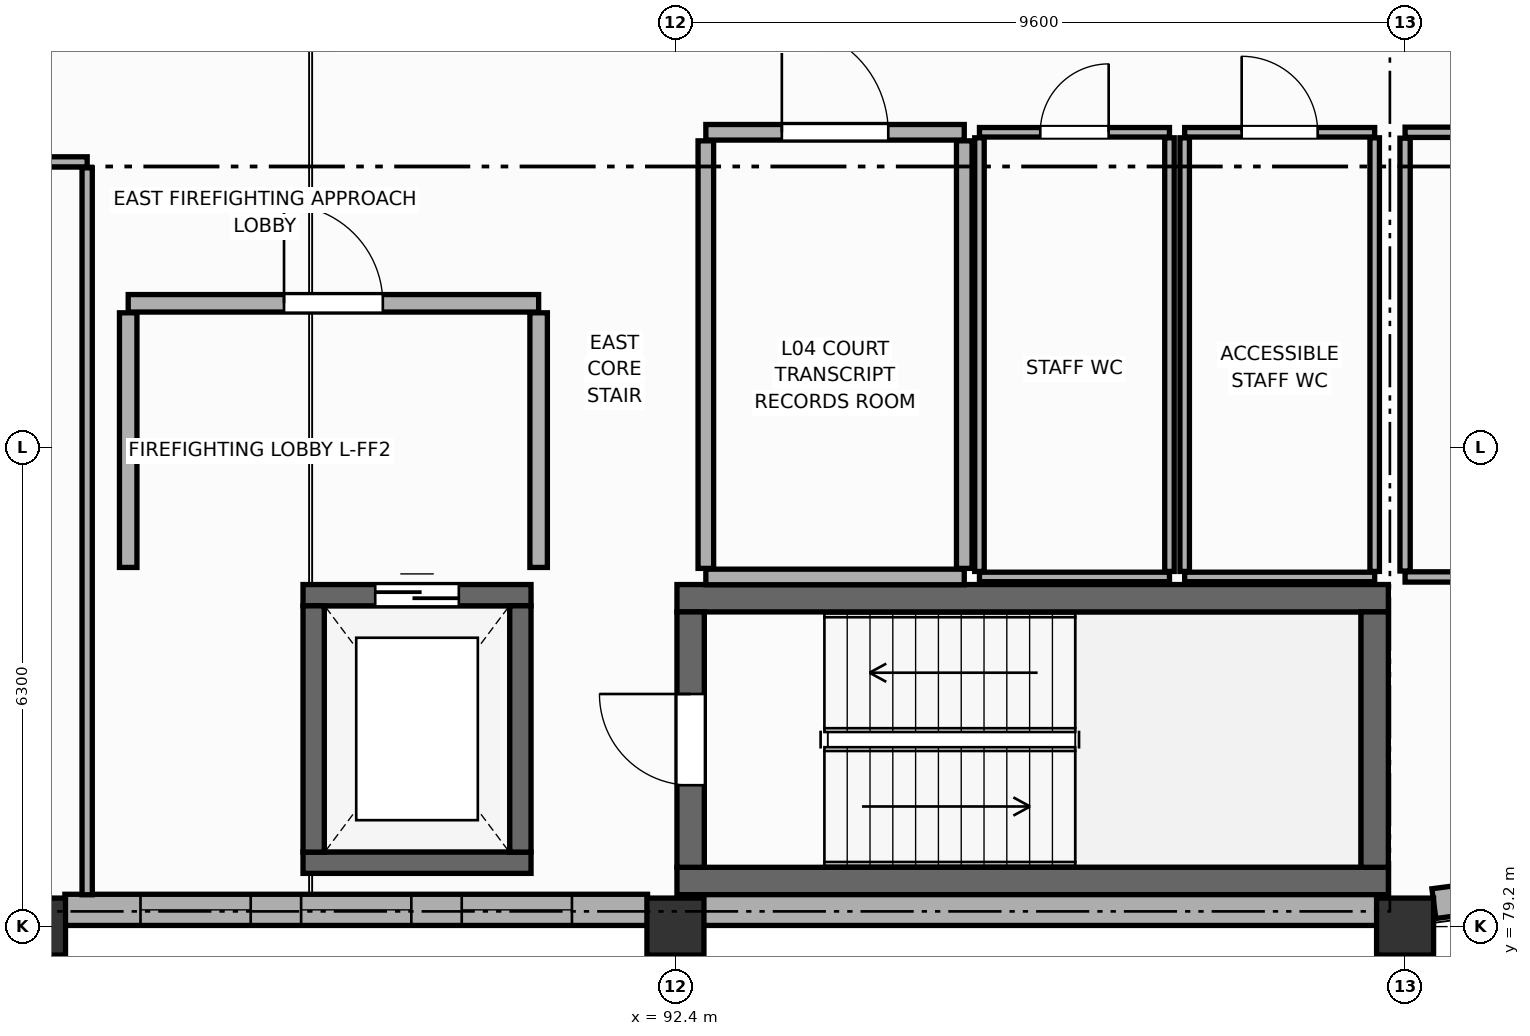
"""IFC4 building model, lengths in metres.
Left out: names, types, materials, properties, quantities, classifications, styles, units other than length and angle.
Written with IfcOpenShell. Run it as: python <this file> out.ifc"""

import sys

from ifc_helpers import new_model, si_unit, direction, frame, frame_2d, origin, origin_2d, place, context, subcontext, project, spatial, rectangle, extrude, element, fill, save


model = new_model("IFC4")
c1 = context("Model", 3, precision=1e-05, world=origin(), true_north=direction((0.0, 1.0)))
c2 = subcontext(c1, "Body", "Model", "MODEL_VIEW")
j1 = project(units=[si_unit("LENGTHUNIT", "METRE"), si_unit("PLANEANGLEUNIT", "RADIAN")], contexts=[c1])
p1 = place(None, origin())
s1 = spatial("IfcSite", under=j1, at=p1, CompositionType="ELEMENT")
p2 = place(p1, origin())
s2 = spatial("IfcBuilding", under=s1, at=p2, CompositionType="ELEMENT")
p3 = place(p2, frame((0.0, 0.0, 14.4)))
s3 = spatial("IfcBuildingStorey", under=s2, at=p3, CompositionType="ELEMENT", Elevation=14.4)
for number, where, z_axis, x_axis in (
    (1, (84.0, 79.2, 0.0), (0.0, 0.0, 1.0), (1.0, 0.0, 0.0)),
    (2, (92.4, 79.2, 0.0), (0.0, 0.0, 1.0), (1.0, 0.0, 0.0)),
    (3, (102.0, 79.2, 0.0), (0.0, 0.0, 1.0), (1.0, 0.0, 0.0)),
):
    element("IfcColumn", number, at=place(p3, frame(where, z_axis=z_axis, x_axis=x_axis)), inside=s3, PredefinedType="COLUMN", context=c2, shape_type="SweptSolid", body=[
        extrude(rectangle(XDim=0.75, YDim=0.75, at=origin_2d()), origin(), (0.0, 0.0, 1.0), 4.2),
    ])
p4 = place(p3, frame((92.033, 79.42, 0.0), z_axis=(0.0, 0.0, 1.0), x_axis=(-1.0, 0.0, 0.0)))
e4 = element("IfcWall", 4, at=p4, inside=s3, PredefinedType="STANDARD", context=c2, shape_type="SweptSolid", body=[
    extrude(rectangle(XDim=7.666, YDim=0.41, at=frame_2d((3.833, 0.0))), origin(), (0.0, 0.0, 1.0), 3.09),
])
p5 = place(p4, frame((0.995, 0.0, 0.85)))
e5 = element("IfcOpeningElement", 5, at=p5, cuts=e4, PredefinedType="OPENING", context=c2, shape_type="SweptSolid", body=[
    extrude(rectangle(XDim=1.45, YDim=2.05, at=frame_2d((0.725, 1.025))), frame((0.0, 0.215, 0.0), z_axis=(0.0, -1.0, 0.0), x_axis=(1.0, 0.0, 0.0)), (0.0, 0.0, 1.0), 0.43),
])
p6 = place(p4, frame((3.108, 0.0, 0.85)))
e6 = element("IfcOpeningElement", 6, at=p6, cuts=e4, PredefinedType="OPENING", context=c2, shape_type="SweptSolid", body=[
    extrude(rectangle(XDim=1.45, YDim=2.05, at=frame_2d((0.725, 1.025))), frame((0.0, 0.215, 0.0), z_axis=(0.0, -1.0, 0.0), x_axis=(1.0, 0.0, 0.0)), (0.0, 0.0, 1.0), 0.43),
])
p7 = place(p4, frame((5.221, 0.0, 0.85)))
e7 = element("IfcOpeningElement", 7, at=p7, cuts=e4, PredefinedType="OPENING", context=c2, shape_type="SweptSolid", body=[
    extrude(rectangle(XDim=1.45, YDim=2.05, at=frame_2d((0.725, 1.025))), frame((0.0, 0.215, 0.0), z_axis=(0.0, -1.0, 0.0), x_axis=(1.0, 0.0, 0.0)), (0.0, 0.0, 1.0), 0.43),
])
p8 = place(p3, frame((101.633, 79.42, 0.0), z_axis=(0.0, 0.0, 1.0), x_axis=(-1.0, 0.0, 0.0)))
e8 = element("IfcWall", 8, at=p8, inside=s3, PredefinedType="STANDARD", context=c2, shape_type="SweptSolid", body=[
    extrude(rectangle(XDim=8.866, YDim=0.41, at=frame_2d((4.433, 0.0))), origin(), (0.0, 0.0, 1.0), 3.09),
])
p9 = place(p3, frame((102.379, 79.502, 0.0), z_axis=(0.0, 0.0, 1.0), x_axis=(0.991440991126, 0.130555586306, 0.0)))
e9 = element("IfcWall", 9, at=p9, inside=s3, PredefinedType="ELEMENTEDWALL", context=c2, shape_type="SweptSolid", body=[
    extrude(rectangle(XDim=2.874, YDim=0.395, at=frame_2d((1.437, 0.0))), origin(), (0.0, 0.0, 1.0), 3.09),
])
p10 = place(p9, frame((1.037, 0.0, 0.85)))
e10 = element("IfcOpeningElement", 10, at=p10, cuts=e9, PredefinedType="OPENING", context=c2, shape_type="SweptSolid", body=[
    extrude(rectangle(XDim=0.8, YDim=1.7, at=frame_2d((0.4, 0.85))), frame((0.0, 0.208, 0.0), z_axis=(0.0, -1.0, 0.0), x_axis=(1.0, 0.0, 0.0)), (0.0, 0.0, 1.0), 0.415),
])
p11 = place(p3, frame((102.2, 79.0, 0.235), z_axis=(0.0, 0.0, 1.0), x_axis=(1.0, 0.0, 0.0)))
e11 = element("IfcWall", 11, at=p11, inside=s3, PredefinedType="PARAPET", context=c2, shape_type="SweptSolid", body=[
    extrude(rectangle(XDim=17.6, YDim=0.265, at=frame_2d((8.8, 0.0))), origin(), (0.0, 0.0, 1.0), 1.145),
])
for number, where, z_axis, x_axis in (
    (12, (92.42, 83.52, 0.0), (0.0, 0.0, 1.0), (1.0, 0.0, 0.0)),
    (13, (101.78, 79.8, 0.0), (0.0, 0.0, 1.0), (-1.0, 0.0, 0.0)),
):
    element("IfcWall", number, at=place(p3, frame(where, z_axis=z_axis, x_axis=x_axis)), inside=s3, PredefinedType="SHEAR", context=c2, shape_type="SweptSolid", body=[
        extrude(rectangle(XDim=9.36, YDim=0.36, at=frame_2d((4.68, 0.0))), origin(), (0.0, 0.0, 1.0), 3.96),
    ])
p12 = place(p3, frame((92.6, 79.98, 0.0), z_axis=(0.0, 0.0, 1.0), x_axis=(0.0, 1.0, 0.0)))
e14 = element("IfcWall", 14, at=p12, inside=s3, PredefinedType="SHEAR", context=c2, shape_type="SweptSolid", body=[
    extrude(rectangle(XDim=3.36, YDim=0.36, at=frame_2d((1.68, 0.0))), origin(), (0.0, 0.0, 1.0), 3.96),
])
p13 = place(p12, frame((1.08, 0.0, 0.0)))
e15 = element("IfcOpeningElement", 15, at=p13, cuts=e14, PredefinedType="OPENING", context=c2, shape_type="SweptSolid", body=[
    extrude(rectangle(XDim=1.2, YDim=2.2, at=frame_2d((0.6, 1.1))), frame((0.0, 0.19, 0.0), z_axis=(0.0, -1.0, 0.0), x_axis=(1.0, 0.0, 0.0)), (0.0, 0.0, 1.0), 0.38),
])
p14 = place(p3, frame((101.6, 83.34, 0.0), z_axis=(0.0, 0.0, 1.0), x_axis=(0.0, -1.0, 0.0)))
e16 = element("IfcWall", 16, at=p14, inside=s3, PredefinedType="SHEAR", context=c2, shape_type="SweptSolid", body=[
    extrude(rectangle(XDim=3.36, YDim=0.36, at=frame_2d((1.68, 0.0))), origin(), (0.0, 0.0, 1.0), 3.96),
])
p15 = place(p3, frame((87.5, 83.56, 0.0), z_axis=(0.0, 0.0, 1.0), x_axis=(1.0, 0.0, 0.0)))
e17 = element("IfcWall", 17, at=p15, inside=s3, PredefinedType="SHEAR", context=c2, shape_type="SweptSolid", body=[
    extrude(rectangle(XDim=3.0, YDim=0.28, at=frame_2d((1.5, 0.0))), origin(), (0.0, 0.0, 1.0), 3.96),
])
p16 = place(p15, frame((0.95, 0.0, 0.0)))
e18 = element("IfcOpeningElement", 18, at=p16, cuts=e17, PredefinedType="OPENING", context=c2, shape_type="SweptSolid", body=[
    extrude(rectangle(XDim=1.1, YDim=2.2, at=frame_2d((0.55, 1.1))), frame((0.0, 0.15, 0.0), z_axis=(0.0, -1.0, 0.0), x_axis=(1.0, 0.0, 0.0)), (0.0, 0.0, 1.0), 0.3),
])
p17 = place(p3, frame((90.5, 80.04, 0.0), z_axis=(0.0, 0.0, 1.0), x_axis=(-1.0, 0.0, 0.0)))
e19 = element("IfcWall", 19, at=p17, inside=s3, PredefinedType="SHEAR", context=c2, shape_type="SweptSolid", body=[
    extrude(rectangle(XDim=3.0, YDim=0.28, at=frame_2d((1.5, 0.0))), origin(), (0.0, 0.0, 1.0), 3.96),
])
for number, where, z_axis, x_axis in (
    (20, (87.64, 80.18, 0.0), (0.0, 0.0, 1.0), (0.0, 1.0, 0.0)),
    (21, (90.36, 83.42, 0.0), (0.0, 0.0, 1.0), (0.0, -1.0, 0.0)),
):
    element("IfcWall", number, at=place(p3, frame(where, z_axis=z_axis, x_axis=x_axis)), inside=s3, PredefinedType="SHEAR", context=c2, shape_type="SweptSolid", body=[
        extrude(rectangle(XDim=3.24, YDim=0.28, at=frame_2d((1.62, 0.0))), origin(), (0.0, 0.0, 1.0), 3.96),
    ])
p18 = place(p3, frame((85.2, 87.4, 0.0), z_axis=(0.0, 0.0, 1.0), x_axis=(1.0, 0.0, 0.0)))
e22 = element("IfcWall", 22, at=p18, inside=s3, PredefinedType="STANDARD", context=c2, shape_type="SweptSolid", body=[
    extrude(rectangle(XDim=5.4, YDim=0.23, at=frame_2d((2.7, 0.0))), origin(), (0.0, 0.0, 1.0), 3.34),
])
p19 = place(p18, frame((2.05, 0.0, 0.0)))
e23 = element("IfcOpeningElement", 23, at=p19, cuts=e22, PredefinedType="OPENING", context=c2, shape_type="SweptSolid", body=[
    extrude(rectangle(XDim=1.3, YDim=2.2, at=frame_2d((0.65, 1.1))), frame((0.0, 0.125, 0.0), z_axis=(0.0, -1.0, 0.0), x_axis=(1.0, 0.0, 0.0)), (0.0, 0.0, 1.0), 0.25),
])
for number, where, z_axis, x_axis in (
    (24, (85.2, 83.925, 0.0), (0.0, 0.0, 1.0), (0.0, 1.0, 0.0)),
    (25, (90.6, 87.275, 0.0), (0.0, 0.0, 1.0), (0.0, -1.0, 0.0)),
):
    element("IfcWall", number, at=place(p3, frame(where, z_axis=z_axis, x_axis=x_axis)), inside=s3, PredefinedType="STANDARD", context=c2, shape_type="SweptSolid", body=[
        extrude(rectangle(XDim=3.35, YDim=0.23, at=frame_2d((1.675, 0.0))), origin(), (0.0, 0.0, 1.0), 3.34),
    ])
p20 = place(p3, frame((96.4, 89.65, 0.0), z_axis=(0.0, 0.0, 1.0), x_axis=(1.0, 0.0, 0.0)))
e26 = element("IfcWall", 26, at=p20, inside=s3, PredefinedType="PARTITIONING", context=c2, shape_type="SweptSolid", body=[
    extrude(rectangle(XDim=2.5, YDim=0.125, at=frame_2d((1.25, 0.0))), origin(), (0.0, 0.0, 1.0), 3.945),
])
p21 = place(p20, frame((0.8, 0.0, 0.0)))
e27 = element("IfcOpeningElement", 27, at=p21, cuts=e26, PredefinedType="OPENING", context=c2, shape_type="SweptSolid", body=[
    extrude(rectangle(XDim=0.9, YDim=2.1, at=frame_2d((0.45, 1.05))), frame((0.0, 0.073, 0.0), z_axis=(0.0, -1.0, 0.0), x_axis=(1.0, 0.0, 0.0)), (0.0, 0.0, 1.0), 0.145),
])
p22 = place(p3, frame((98.9, 83.8, 0.0), z_axis=(0.0, 0.0, 1.0), x_axis=(-1.0, 0.0, 0.0)))
e28 = element("IfcWall", 28, at=p22, inside=s3, PredefinedType="PARTITIONING", context=c2, shape_type="SweptSolid", body=[
    extrude(rectangle(XDim=2.5, YDim=0.125, at=frame_2d((1.25, 0.0))), origin(), (0.0, 0.0, 1.0), 3.945),
])
for number, where, z_axis, x_axis in (
    (29, (96.4, 83.873, 0.0), (0.0, 0.0, 1.0), (0.0, 1.0, 0.0)),
    (30, (98.9, 89.577, 0.0), (0.0, 0.0, 1.0), (0.0, -1.0, 0.0)),
):
    element("IfcWall", number, at=place(p3, frame(where, z_axis=z_axis, x_axis=x_axis)), inside=s3, PredefinedType="PARTITIONING", context=c2, shape_type="SweptSolid", body=[
        extrude(rectangle(XDim=5.705, YDim=0.125, at=frame_2d((2.853, 0.0))), origin(), (0.0, 0.0, 1.0), 3.34),
    ])
p23 = place(p3, frame((99.1, 89.65, 0.0), z_axis=(0.0, 0.0, 1.0), x_axis=(1.0, 0.0, 0.0)))
e31 = element("IfcWall", 31, at=p23, inside=s3, PredefinedType="PARTITIONING", context=c2, shape_type="SweptSolid", body=[
    extrude(rectangle(XDim=2.5, YDim=0.125, at=frame_2d((1.25, 0.0))), origin(), (0.0, 0.0, 1.0), 3.09),
])
p24 = place(p23, frame((0.75, 0.0, 0.0)))
e32 = element("IfcOpeningElement", 32, at=p24, cuts=e31, PredefinedType="OPENING", context=c2, shape_type="SweptSolid", body=[
    extrude(rectangle(XDim=1.0, YDim=2.1, at=frame_2d((0.5, 1.05))), frame((0.0, 0.073, 0.0), z_axis=(0.0, -1.0, 0.0), x_axis=(1.0, 0.0, 0.0)), (0.0, 0.0, 1.0), 0.145),
])
p25 = place(p3, frame((101.6, 83.8, 0.0), z_axis=(0.0, 0.0, 1.0), x_axis=(-1.0, 0.0, 0.0)))
e33 = element("IfcWall", 33, at=p25, inside=s3, PredefinedType="PARTITIONING", context=c2, shape_type="SweptSolid", body=[
    extrude(rectangle(XDim=2.5, YDim=0.125, at=frame_2d((1.25, 0.0))), origin(), (0.0, 0.0, 1.0), 3.09),
])
p26 = place(p3, frame((99.1, 83.873, 0.0), z_axis=(0.0, 0.0, 1.0), x_axis=(0.0, 1.0, 0.0)))
e34 = element("IfcWall", 34, at=p26, inside=s3, PredefinedType="PARTITIONING", context=c2, shape_type="SweptSolid", body=[
    extrude(rectangle(XDim=5.705, YDim=0.125, at=frame_2d((2.853, 0.0))), origin(), (0.0, 0.0, 1.0), 3.34),
])
p27 = place(p3, frame((101.6, 89.577, 0.0), z_axis=(0.0, 0.0, 1.0), x_axis=(0.0, -1.0, 0.0)))
e35 = element("IfcWall", 35, at=p27, inside=s3, PredefinedType="PARTITIONING", context=c2, shape_type="SweptSolid", body=[
    extrude(rectangle(XDim=5.705, YDim=0.125, at=frame_2d((2.853, 0.0))), origin(), (0.0, 0.0, 1.0), 3.09),
])
p28 = place(p3, frame((92.8, 89.65, 0.0), z_axis=(0.0, 0.0, 1.0), x_axis=(1.0, 0.0, 0.0)))
e36 = element("IfcWall", 36, at=p28, inside=s3, PredefinedType="STANDARD", context=c2, shape_type="SweptSolid", body=[
    extrude(rectangle(XDim=3.4, YDim=0.205, at=frame_2d((1.7, 0.0))), origin(), (0.0, 0.0, 1.0), 3.09),
])
p29 = place(p28, frame((1.0, 0.0, 0.0)))
e37 = element("IfcOpeningElement", 37, at=p29, cuts=e36, PredefinedType="OPENING", context=c2, shape_type="SweptSolid", body=[
    extrude(rectangle(XDim=1.4, YDim=2.25, at=frame_2d((0.7, 1.125))), frame((0.0, 0.113, 0.0), z_axis=(0.0, -1.0, 0.0), x_axis=(1.0, 0.0, 0.0)), (0.0, 0.0, 1.0), 0.225),
])
p30 = place(p3, frame((96.2, 83.8, 0.0), z_axis=(0.0, 0.0, 1.0), x_axis=(-1.0, 0.0, 0.0)))
e38 = element("IfcWall", 38, at=p30, inside=s3, PredefinedType="STANDARD", context=c2, shape_type="SweptSolid", body=[
    extrude(rectangle(XDim=3.4, YDim=0.205, at=frame_2d((1.7, 0.0))), origin(), (0.0, 0.0, 1.0), 3.09),
])
p31 = place(p3, frame((92.8, 83.913, 0.0), z_axis=(0.0, 0.0, 1.0), x_axis=(0.0, 1.0, 0.0)))
e39 = element("IfcWall", 39, at=p31, inside=s3, PredefinedType="STANDARD", context=c2, shape_type="SweptSolid", body=[
    extrude(rectangle(XDim=5.625, YDim=0.205, at=frame_2d((2.812, 0.0))), origin(), (0.0, 0.0, 1.0), 3.09),
])
p32 = place(p3, frame((96.2, 89.538, 0.0), z_axis=(0.0, 0.0, 1.0), x_axis=(0.0, -1.0, 0.0)))
e40 = element("IfcWall", 40, at=p32, inside=s3, PredefinedType="STANDARD", context=c2, shape_type="SweptSolid", body=[
    extrude(rectangle(XDim=5.625, YDim=0.205, at=frame_2d((2.812, 0.0))), origin(), (0.0, 0.0, 1.0), 3.34),
])
p33 = place(p3, frame((79.94, 89.26, 0.0), z_axis=(0.0, 0.0, 1.0), x_axis=(1.0, 0.0, 0.0)))
e41 = element("IfcWall", 41, at=p33, inside=s3, PredefinedType="PARTITIONING", context=c2, shape_type="SweptSolid", body=[
    extrude(rectangle(XDim=4.72, YDim=0.135, at=frame_2d((2.36, 0.0))), origin(), (0.0, 0.0, 1.0), 3.09),
])
p34 = place(p33, frame((1.55, 0.0, 0.0)))
e42 = element("IfcOpeningElement", 42, at=p34, cuts=e41, PredefinedType="OPENING", context=c2, shape_type="SweptSolid", body=[
    extrude(rectangle(XDim=1.02, YDim=2.15, at=frame_2d((0.51, 1.075))), frame((0.0, 0.077, 0.0), z_axis=(0.0, -1.0, 0.0), x_axis=(1.0, 0.0, 0.0)), (0.0, 0.0, 1.0), 0.155),
])
p35 = place(p3, frame((84.66, 89.183, 0.0), z_axis=(0.0, 0.0, 1.0), x_axis=(0.0, -1.0, 0.0)))
e43 = element("IfcWall", 43, at=p35, inside=s3, PredefinedType="PARTITIONING", context=c2, shape_type="SweptSolid", body=[
    extrude(rectangle(XDim=9.564, YDim=0.135, at=frame_2d((4.782, 0.0))), origin(), (0.0, 0.0, 1.0), 3.34),
])
p36 = place(p3, frame((102.0, 89.65, 0.0), z_axis=(0.0, 0.0, 1.0), x_axis=(1.0, 0.0, 0.0)))
e44 = element("IfcWall", 44, at=p36, inside=s3, PredefinedType="PARTITIONING", context=c2, shape_type="SweptSolid", body=[
    extrude(rectangle(XDim=9.5, YDim=0.135, at=frame_2d((4.75, 0.0))), origin(), (0.0, 0.0, 1.0), 2.99),
])
p37 = place(p36, frame((1.92, 0.0, 0.0)))
e45 = element("IfcOpeningElement", 45, at=p37, cuts=e44, PredefinedType="OPENING", context=c2, shape_type="SweptSolid", body=[
    extrude(rectangle(XDim=0.95, YDim=2.15, at=frame_2d((0.475, 1.075))), frame((0.0, 0.077, 0.0), z_axis=(0.0, -1.0, 0.0), x_axis=(1.0, 0.0, 0.0)), (0.0, 0.0, 1.0), 0.155),
])
p38 = place(p3, frame((111.5, 83.8, 0.0), z_axis=(0.0, 0.0, 1.0), x_axis=(-1.0, 0.0, 0.0)))
e46 = element("IfcWall", 46, at=p38, inside=s3, PredefinedType="PARTITIONING", context=c2, shape_type="SweptSolid", body=[
    extrude(rectangle(XDim=9.5, YDim=0.135, at=frame_2d((4.75, 0.0))), origin(), (0.0, 0.0, 1.0), 2.99),
])
p39 = place(p3, frame((102.0, 83.877, 0.0), z_axis=(0.0, 0.0, 1.0), x_axis=(0.0, 1.0, 0.0)))
e47 = element("IfcWall", 47, at=p39, inside=s3, PredefinedType="PARTITIONING", context=c2, shape_type="SweptSolid", body=[
    extrude(rectangle(XDim=5.695, YDim=0.135, at=frame_2d((2.848, 0.0))), origin(), (0.0, 0.0, 1.0), 3.09),
])
p40 = place(p5, origin())
e48 = element("IfcWindow", 48, at=p40, inside=s3, PartitioningType="SINGLE_PANEL", PredefinedType="WINDOW", context=c2, shape_type="SweptSolid", body=[
    extrude(rectangle(XDim=1.45, YDim=2.05, at=frame_2d((0.725, 1.025))), frame((0.0, 0.03, 0.0), z_axis=(0.0, -1.0, 0.0), x_axis=(1.0, 0.0, 0.0)), (0.0, 0.0, 1.0), 0.06),
])
fill(e5, e48)
p41 = place(p6, origin())
e49 = element("IfcWindow", 49, at=p41, inside=s3, PartitioningType="SINGLE_PANEL", PredefinedType="WINDOW", context=c2, shape_type="SweptSolid", body=[
    extrude(rectangle(XDim=1.45, YDim=2.05, at=frame_2d((0.725, 1.025))), frame((0.0, 0.03, 0.0), z_axis=(0.0, -1.0, 0.0), x_axis=(1.0, 0.0, 0.0)), (0.0, 0.0, 1.0), 0.06),
])
fill(e6, e49)
p42 = place(p7, origin())
e50 = element("IfcWindow", 50, at=p42, inside=s3, PartitioningType="SINGLE_PANEL", PredefinedType="WINDOW", context=c2, shape_type="SweptSolid", body=[
    extrude(rectangle(XDim=1.45, YDim=2.05, at=frame_2d((0.725, 1.025))), frame((0.0, 0.03, 0.0), z_axis=(0.0, -1.0, 0.0), x_axis=(1.0, 0.0, 0.0)), (0.0, 0.0, 1.0), 0.06),
])
fill(e7, e50)
p43 = place(p13, origin())
e51 = element("IfcDoor", 51, at=p43, inside=s3, OperationType="SINGLE_SWING_RIGHT", PredefinedType="DOOR", context=c2, shape_type="SweptSolid", body=[
    extrude(rectangle(XDim=1.2, YDim=2.2, at=frame_2d((0.6, 1.1))), frame((0.0, 0.025, 0.0), z_axis=(0.0, -1.0, 0.0), x_axis=(1.0, 0.0, 0.0)), (0.0, 0.0, 1.0), 0.05),
])
fill(e15, e51)
p44 = place(p16, origin())
e52 = element("IfcDoor", 52, at=p44, inside=s3, OperationType="DOUBLE_DOOR_SLIDING", PredefinedType="DOOR", context=c2, shape_type="SweptSolid", body=[
    extrude(rectangle(XDim=1.1, YDim=2.2, at=frame_2d((0.55, 1.1))), frame((0.0, 0.025, 0.0), z_axis=(0.0, -1.0, 0.0), x_axis=(1.0, 0.0, 0.0)), (0.0, 0.0, 1.0), 0.05),
])
fill(e18, e52)
p45 = place(p19, origin())
e53 = element("IfcDoor", 53, at=p45, inside=s3, OperationType="SINGLE_SWING_LEFT", PredefinedType="DOOR", context=c2, shape_type="SweptSolid", body=[
    extrude(rectangle(XDim=1.3, YDim=2.2, at=frame_2d((0.65, 1.1))), frame((0.0, 0.025, 0.0), z_axis=(0.0, -1.0, 0.0), x_axis=(1.0, 0.0, 0.0)), (0.0, 0.0, 1.0), 0.05),
])
fill(e23, e53)
p46 = place(p21, origin())
e54 = element("IfcDoor", 54, at=p46, inside=s3, OperationType="SINGLE_SWING_RIGHT", PredefinedType="DOOR", context=c2, shape_type="SweptSolid", body=[
    extrude(rectangle(XDim=0.9, YDim=2.1, at=frame_2d((0.45, 1.05))), frame((0.0, 0.025, 0.0), z_axis=(0.0, -1.0, 0.0), x_axis=(1.0, 0.0, 0.0)), (0.0, 0.0, 1.0), 0.05),
])
fill(e27, e54)
p47 = place(p24, origin())
e55 = element("IfcDoor", 55, at=p47, inside=s3, OperationType="SINGLE_SWING_LEFT", PredefinedType="DOOR", context=c2, shape_type="SweptSolid", body=[
    extrude(rectangle(XDim=1.0, YDim=2.1, at=frame_2d((0.5, 1.05))), frame((0.0, 0.025, 0.0), z_axis=(0.0, -1.0, 0.0), x_axis=(1.0, 0.0, 0.0)), (0.0, 0.0, 1.0), 0.05),
])
fill(e32, e55)
p48 = place(p29, origin())
e56 = element("IfcDoor", 56, at=p48, inside=s3, OperationType="SINGLE_SWING_LEFT", PredefinedType="DOOR", context=c2, shape_type="SweptSolid", body=[
    extrude(rectangle(XDim=1.4, YDim=2.25, at=frame_2d((0.7, 1.125))), frame((0.0, 0.025, 0.0), z_axis=(0.0, -1.0, 0.0), x_axis=(1.0, 0.0, 0.0)), (0.0, 0.0, 1.0), 0.05),
])
fill(e37, e56)
save(model, sys.argv[1])
